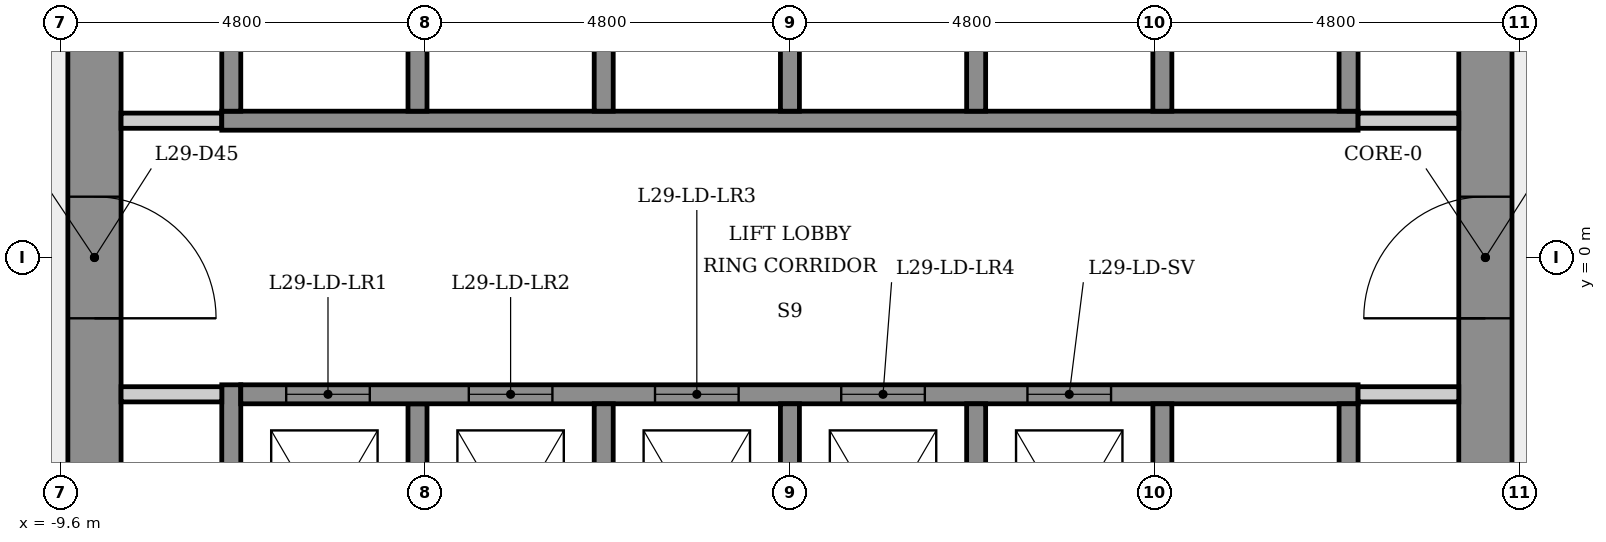
"""IFC4 building model, lengths in metres.
Left out: names, types, materials, properties, quantities, classifications, styles, units other than length and angle.
Written with IfcOpenShell. Run it as: python <this file> out.ifc"""

import sys

from ifc_helpers import new_model, si_unit, direction, frame, frame_2d, origin, place, context, subcontext, project, spatial, rectangle, extrude, element, fill, save


model = new_model("IFC4")
c1 = context("Model", 3, precision=1e-05, world=origin(), true_north=direction((0.0, 1.0)))
c2 = subcontext(c1, "Body", "Model", "MODEL_VIEW")
j1 = project(units=[si_unit("LENGTHUNIT", "METRE"), si_unit("PLANEANGLEUNIT", "RADIAN")], contexts=[c1])
p1 = place(None, origin())
s1 = spatial("IfcSite", under=j1, at=p1, CompositionType="ELEMENT")
p2 = place(p1, origin())
s2 = spatial("IfcBuilding", under=s1, at=p2, CompositionType="ELEMENT")
p3 = place(p2, frame((0.0, 0.0, 110.3)))
s3 = spatial("IfcBuildingStorey", under=s2, at=p3, CompositionType="ELEMENT", Elevation=110.3)
p4 = place(p3, frame((9.15, -5.485, 0.0), z_axis=(0.0, 0.0, 1.0), x_axis=(0.0, 1.0, 0.0)))
e1 = element("IfcWall", 1, at=p4, inside=s3, PredefinedType="SHEAR", context=c2, shape_type="SweptSolid", body=[
    extrude(rectangle(XDim=10.97, YDim=0.7, at=frame_2d((5.485, 0.0))), origin(), (0.0, 0.0, 1.0), 3.4),
])
p5 = place(p4, frame((4.685, 0.0, 0.0)))
e2 = element("IfcOpeningElement", 2, at=p5, cuts=e1, PredefinedType="OPENING", context=c2, shape_type="SweptSolid", body=[
    extrude(rectangle(XDim=1.6, YDim=2.1, at=frame_2d((0.8, 1.05))), frame((0.0, 0.36, 0.0), z_axis=(0.0, -1.0, 0.0), x_axis=(1.0, 0.0, 0.0)), (0.0, 0.0, 1.0), 0.72),
])
p6 = place(p3, frame((-9.15, 5.485, 0.0), z_axis=(0.0, 0.0, 1.0), x_axis=(0.0, -1.0, 0.0)))
e3 = element("IfcWall", 3, at=p6, inside=s3, PredefinedType="SHEAR", context=c2, shape_type="SweptSolid", body=[
    extrude(rectangle(XDim=10.97, YDim=0.7, at=frame_2d((5.485, 0.0))), origin(), (0.0, 0.0, 1.0), 3.4),
])
p7 = place(p6, frame((4.685, 0.0, 0.0)))
e4 = element("IfcOpeningElement", 4, at=p7, cuts=e3, PredefinedType="OPENING", context=c2, shape_type="SweptSolid", body=[
    extrude(rectangle(XDim=1.6, YDim=2.1, at=frame_2d((0.8, 1.05))), frame((0.0, 0.36, 0.0), z_axis=(0.0, -1.0, 0.0), x_axis=(1.0, 0.0, 0.0)), (0.0, 0.0, 1.0), 0.72),
])
p8 = place(p3, frame((-8.8, 1.8, 0.0), z_axis=(0.0, 0.0, 1.0), x_axis=(1.0, 0.0, 0.0)))
e5 = element("IfcWall", 5, at=p8, inside=s3, PredefinedType="PARTITIONING", context=c2, shape_type="SweptSolid", body=[
    extrude(rectangle(XDim=1.325, YDim=0.2, at=frame_2d((0.663, 0.0))), origin(), (0.0, 0.0, 1.0), 3.05),
])
p9 = place(p3, frame((-7.475, 1.8, 0.0), z_axis=(0.0, 0.0, 1.0), x_axis=(1.0, 0.0, 0.0)))
e6 = element("IfcWall", 6, at=p9, inside=s3, PredefinedType="SHEAR", context=c2, shape_type="SweptSolid", body=[
    extrude(rectangle(XDim=14.95, YDim=0.25, at=frame_2d((7.475, 0.0))), origin(), (0.0, 0.0, 1.0), 3.05),
])
p10 = place(p3, frame((-7.35, -5.846, 0.0), z_axis=(0.0, 0.0, 1.0), x_axis=(0.0, 1.0, 0.0)))
e7 = element("IfcWall", 7, at=p10, inside=s3, PredefinedType="SHEAR", context=c2, shape_type="SweptSolid", body=[
    extrude(rectangle(XDim=4.171, YDim=0.25, at=frame_2d((2.085, 0.0))), origin(), (0.0, 0.0, 1.0), 3.05),
])
p11 = place(p3, frame((-7.35, 1.925, 0.0), z_axis=(0.0, 0.0, 1.0), x_axis=(0.0, 1.0, 0.0)))
e8 = element("IfcWall", 8, at=p11, inside=s3, PredefinedType="SHEAR", context=c2, shape_type="SweptSolid", body=[
    extrude(rectangle(XDim=3.921, YDim=0.25, at=frame_2d((1.96, 0.0))), origin(), (0.0, 0.0, 1.0), 3.05),
])
p12 = place(p3, frame((-7.475, -1.8, 0.0), z_axis=(0.0, 0.0, 1.0), x_axis=(-1.0, 0.0, 0.0)))
e9 = element("IfcWall", 9, at=p12, inside=s3, PredefinedType="PARTITIONING", context=c2, shape_type="SweptSolid", body=[
    extrude(rectangle(XDim=1.325, YDim=0.2, at=frame_2d((0.663, 0.0))), origin(), (0.0, 0.0, 1.0), 3.05),
])
for number, where, z_axis, x_axis in (
    (10, (-4.9, -1.925, 0.0), (0.0, 0.0, 1.0), (0.0, -1.0, 0.0)),
    (11, (-4.9, 5.025, 0.0), (0.0, 0.0, 1.0), (0.0, -1.0, 0.0)),
):
    element("IfcWall", number, at=place(p3, frame(where, z_axis=z_axis, x_axis=x_axis)), inside=s3, PredefinedType="SHEAR", context=c2, shape_type="SweptSolid", body=[
        extrude(rectangle(XDim=3.1, YDim=0.25, at=frame_2d((1.55, 0.0))), origin(), (0.0, 0.0, 1.0), 3.4),
    ])
p13 = place(p3, frame((-7.225, -1.8, 0.0), z_axis=(0.0, 0.0, 1.0), x_axis=(1.0, 0.0, 0.0)))
e12 = element("IfcWall", 12, at=p13, inside=s3, PredefinedType="SHEAR", context=c2, shape_type="SweptSolid", body=[
    extrude(rectangle(XDim=14.7, YDim=0.25, at=frame_2d((7.35, 0.0))), origin(), (0.0, 0.0, 1.0), 3.05),
])
p14 = place(p13, frame((0.597, 0.0, 0.0)))
e13 = element("IfcOpeningElement", 13, at=p14, cuts=e12, PredefinedType="OPENING", context=c2, shape_type="SweptSolid", body=[
    extrude(rectangle(XDim=1.1, YDim=2.1, at=frame_2d((0.55, 1.05))), frame((0.0, 0.135, 0.0), z_axis=(0.0, -1.0, 0.0), x_axis=(1.0, 0.0, 0.0)), (0.0, 0.0, 1.0), 0.27),
])
p15 = place(p13, frame((3.0, 0.0, 0.0)))
e14 = element("IfcOpeningElement", 14, at=p15, cuts=e12, PredefinedType="OPENING", context=c2, shape_type="SweptSolid", body=[
    extrude(rectangle(XDim=1.1, YDim=2.1, at=frame_2d((0.55, 1.05))), frame((0.0, 0.135, 0.0), z_axis=(0.0, -1.0, 0.0), x_axis=(1.0, 0.0, 0.0)), (0.0, 0.0, 1.0), 0.27),
])
p16 = place(p13, frame((5.45, 0.0, 0.0)))
e15 = element("IfcOpeningElement", 15, at=p16, cuts=e12, PredefinedType="OPENING", context=c2, shape_type="SweptSolid", body=[
    extrude(rectangle(XDim=1.1, YDim=2.1, at=frame_2d((0.55, 1.05))), frame((0.0, 0.135, 0.0), z_axis=(0.0, -1.0, 0.0), x_axis=(1.0, 0.0, 0.0)), (0.0, 0.0, 1.0), 0.27),
])
p17 = place(p13, frame((7.9, 0.0, 0.0)))
e16 = element("IfcOpeningElement", 16, at=p17, cuts=e12, PredefinedType="OPENING", context=c2, shape_type="SweptSolid", body=[
    extrude(rectangle(XDim=1.1, YDim=2.1, at=frame_2d((0.55, 1.05))), frame((0.0, 0.135, 0.0), z_axis=(0.0, -1.0, 0.0), x_axis=(1.0, 0.0, 0.0)), (0.0, 0.0, 1.0), 0.27),
])
p18 = place(p13, frame((10.35, 0.0, 0.0)))
e17 = element("IfcOpeningElement", 17, at=p18, cuts=e12, PredefinedType="OPENING", context=c2, shape_type="SweptSolid", body=[
    extrude(rectangle(XDim=1.1, YDim=2.1, at=frame_2d((0.55, 1.05))), frame((0.0, 0.135, 0.0), z_axis=(0.0, -1.0, 0.0), x_axis=(1.0, 0.0, 0.0)), (0.0, 0.0, 1.0), 0.27),
])
for number, where, z_axis, x_axis in (
    (18, (-2.45, -1.925, 0.0), (0.0, 0.0, 1.0), (0.0, -1.0, 0.0)),
    (19, (-2.45, 5.025, 0.0), (0.0, 0.0, 1.0), (0.0, -1.0, 0.0)),
    (20, (0.0, -1.925, 0.0), (0.0, 0.0, 1.0), (0.0, -1.0, 0.0)),
    (21, (0.0, 5.025, 0.0), (0.0, 0.0, 1.0), (0.0, -1.0, 0.0)),
    (22, (2.45, -1.925, 0.0), (0.0, 0.0, 1.0), (0.0, -1.0, 0.0)),
    (23, (2.45, 5.025, 0.0), (0.0, 0.0, 1.0), (0.0, -1.0, 0.0)),
    (24, (4.9, -1.925, 0.0), (0.0, 0.0, 1.0), (0.0, -1.0, 0.0)),
    (25, (4.9, 5.025, 0.0), (0.0, 0.0, 1.0), (0.0, -1.0, 0.0)),
):
    element("IfcWall", number, at=place(p3, frame(where, z_axis=z_axis, x_axis=x_axis)), inside=s3, PredefinedType="SHEAR", context=c2, shape_type="SweptSolid", body=[
        extrude(rectangle(XDim=3.1, YDim=0.25, at=frame_2d((1.55, 0.0))), origin(), (0.0, 0.0, 1.0), 3.4),
    ])
p19 = place(p3, frame((7.475, 1.8, 0.0), z_axis=(0.0, 0.0, 1.0), x_axis=(1.0, 0.0, 0.0)))
e26 = element("IfcWall", 26, at=p19, inside=s3, PredefinedType="PARTITIONING", context=c2, shape_type="SweptSolid", body=[
    extrude(rectangle(XDim=1.325, YDim=0.2, at=frame_2d((0.663, 0.0))), origin(), (0.0, 0.0, 1.0), 3.05),
])
for number, where, z_axis, x_axis in (
    (27, (7.35, -1.925, 0.0), (0.0, 0.0, 1.0), (0.0, -1.0, 0.0)),
    (28, (7.35, 5.025, 0.0), (0.0, 0.0, 1.0), (0.0, -1.0, 0.0)),
):
    element("IfcWall", number, at=place(p3, frame(where, z_axis=z_axis, x_axis=x_axis)), inside=s3, PredefinedType="SHEAR", context=c2, shape_type="SweptSolid", body=[
        extrude(rectangle(XDim=3.1, YDim=0.25, at=frame_2d((1.55, 0.0))), origin(), (0.0, 0.0, 1.0), 3.4),
    ])
p20 = place(p3, frame((8.8, -1.8, 0.0), z_axis=(0.0, 0.0, 1.0), x_axis=(-1.0, 0.0, 0.0)))
e29 = element("IfcWall", 29, at=p20, inside=s3, PredefinedType="PARTITIONING", context=c2, shape_type="SweptSolid", body=[
    extrude(rectangle(XDim=1.325, YDim=0.2, at=frame_2d((0.663, 0.0))), origin(), (0.0, 0.0, 1.0), 3.05),
])
p21 = place(p14, origin())
e30 = element("IfcDoor", 30, at=p21, inside=s3, OperationType="SLIDING_TO_LEFT", PredefinedType="DOOR", context=c2, shape_type="SweptSolid", body=[
    extrude(rectangle(XDim=1.1, YDim=2.1, at=frame_2d((0.55, 1.05))), frame((0.0, 0.025, 0.0), z_axis=(0.0, -1.0, 0.0), x_axis=(1.0, 0.0, 0.0)), (0.0, 0.0, 1.0), 0.05),
])
fill(e13, e30)
p22 = place(p15, origin())
e31 = element("IfcDoor", 31, at=p22, inside=s3, OperationType="SLIDING_TO_LEFT", PredefinedType="DOOR", context=c2, shape_type="SweptSolid", body=[
    extrude(rectangle(XDim=1.1, YDim=2.1, at=frame_2d((0.55, 1.05))), frame((0.0, 0.025, 0.0), z_axis=(0.0, -1.0, 0.0), x_axis=(1.0, 0.0, 0.0)), (0.0, 0.0, 1.0), 0.05),
])
fill(e14, e31)
p23 = place(p16, origin())
e32 = element("IfcDoor", 32, at=p23, inside=s3, OperationType="SLIDING_TO_LEFT", PredefinedType="DOOR", context=c2, shape_type="SweptSolid", body=[
    extrude(rectangle(XDim=1.1, YDim=2.1, at=frame_2d((0.55, 1.05))), frame((0.0, 0.025, 0.0), z_axis=(0.0, -1.0, 0.0), x_axis=(1.0, 0.0, 0.0)), (0.0, 0.0, 1.0), 0.05),
])
fill(e15, e32)
p24 = place(p17, origin())
e33 = element("IfcDoor", 33, at=p24, inside=s3, OperationType="SLIDING_TO_LEFT", PredefinedType="DOOR", context=c2, shape_type="SweptSolid", body=[
    extrude(rectangle(XDim=1.1, YDim=2.1, at=frame_2d((0.55, 1.05))), frame((0.0, 0.025, 0.0), z_axis=(0.0, -1.0, 0.0), x_axis=(1.0, 0.0, 0.0)), (0.0, 0.0, 1.0), 0.05),
])
fill(e16, e33)
p25 = place(p18, origin())
e34 = element("IfcDoor", 34, at=p25, inside=s3, OperationType="SLIDING_TO_LEFT", PredefinedType="DOOR", context=c2, shape_type="SweptSolid", body=[
    extrude(rectangle(XDim=1.1, YDim=2.1, at=frame_2d((0.55, 1.05))), frame((0.0, 0.025, 0.0), z_axis=(0.0, -1.0, 0.0), x_axis=(1.0, 0.0, 0.0)), (0.0, 0.0, 1.0), 0.05),
])
fill(e17, e34)
p26 = place(p5, origin())
e35 = element("IfcDoor", 35, at=p26, inside=s3, OperationType="SINGLE_SWING_LEFT", PredefinedType="DOOR", context=c2, shape_type="SweptSolid", body=[
    extrude(rectangle(XDim=1.6, YDim=2.1, at=frame_2d((0.8, 1.05))), frame((0.0, 0.025, 0.0), z_axis=(0.0, -1.0, 0.0), x_axis=(1.0, 0.0, 0.0)), (0.0, 0.0, 1.0), 0.05),
])
fill(e2, e35)
p27 = place(p7, origin())
e36 = element("IfcDoor", 36, at=p27, inside=s3, OperationType="SINGLE_SWING_RIGHT", PredefinedType="DOOR", context=c2, shape_type="SweptSolid", body=[
    extrude(rectangle(XDim=1.6, YDim=2.1, at=frame_2d((0.8, 1.05))), frame((0.0, 0.025, 0.0), z_axis=(0.0, -1.0, 0.0), x_axis=(1.0, 0.0, 0.0)), (0.0, 0.0, 1.0), 0.05),
])
fill(e4, e36)
save(model, sys.argv[1])
